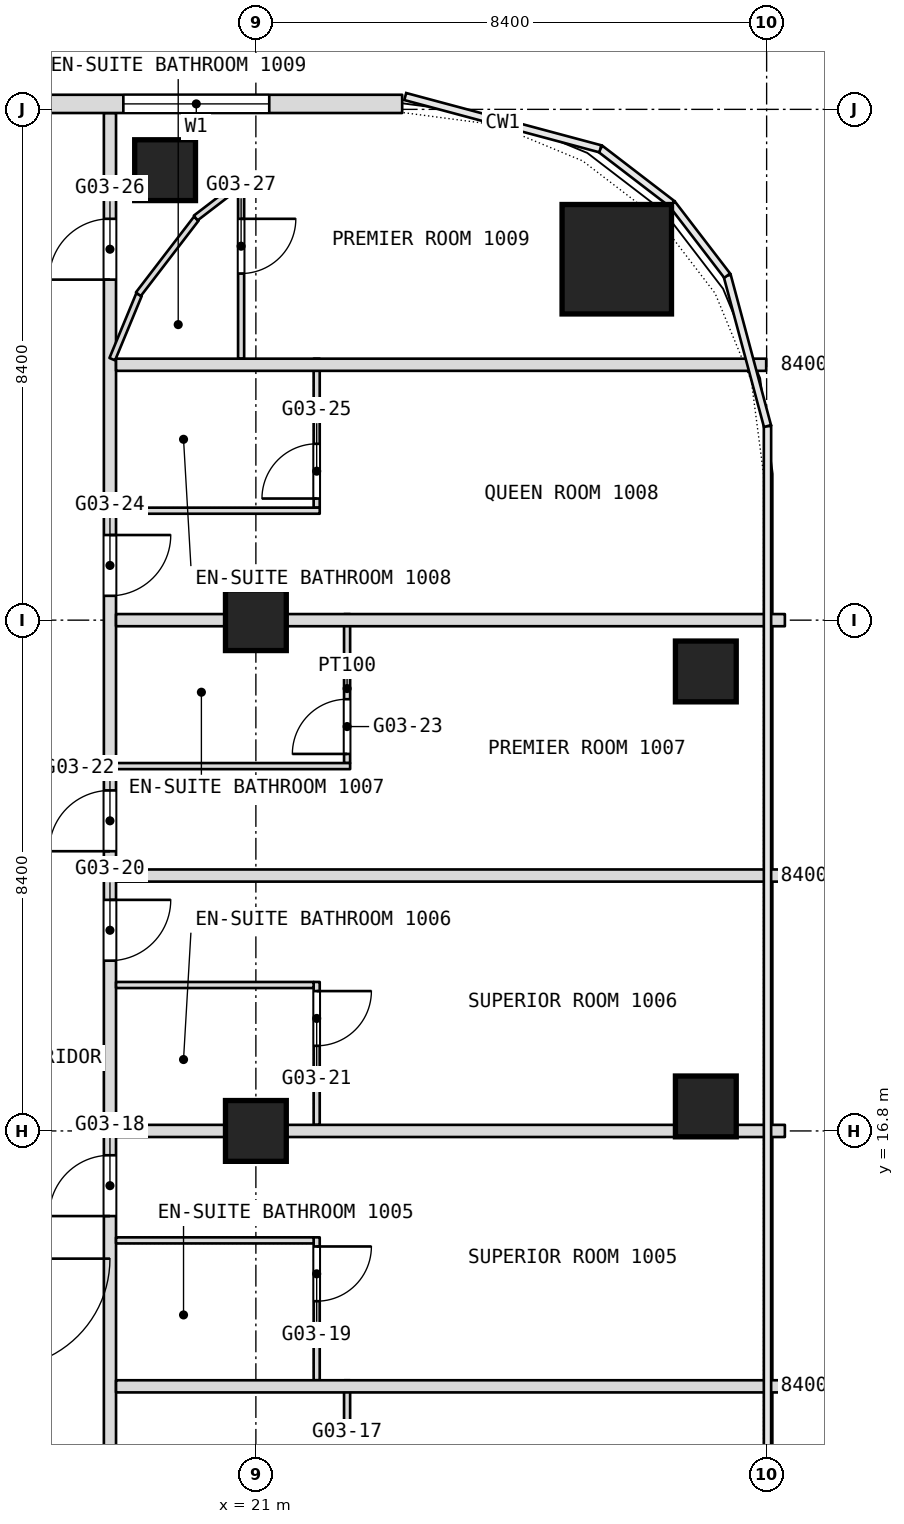
"""IFC4 building model, lengths in metres.
Left out: names, types, materials, properties, quantities, classifications, styles, units other than length and angle.
Written with IfcOpenShell. Run it as: python <this file> out.ifc"""

import sys

from ifc_helpers import new_model, si_unit, direction, frame, frame_2d, origin, origin_2d, place, context, subcontext, project, spatial, rectangle, extrude, element, fill, save


model = new_model("IFC4")
c1 = context("Model", 3, precision=1e-05, world=origin(), true_north=direction((0.0, 1.0)))
c2 = subcontext(c1, "Body", "Model", "MODEL_VIEW")
j1 = project(units=[si_unit("LENGTHUNIT", "METRE"), si_unit("PLANEANGLEUNIT", "RADIAN")], contexts=[c1])
p1 = place(None, origin())
s1 = spatial("IfcSite", under=j1, at=p1, CompositionType="ELEMENT")
p2 = place(p1, origin())
s2 = spatial("IfcBuilding", under=s1, at=p2, CompositionType="ELEMENT")
p3 = place(p2, frame((0.0, 0.0, 50.9)))
s3 = spatial("IfcBuildingStorey", under=s2, at=p3, CompositionType="ELEMENT", Elevation=50.9)
p4 = place(p3, frame((26.936, 31.135, 0.0), z_axis=(0.0, 0.0, 1.0), x_axis=(1.0, 0.0, 0.0)))
e1 = element("IfcColumn", 1, at=p4, inside=s3, PredefinedType="COLUMN", context=c2, shape_type="SweptSolid", body=[
    extrude(rectangle(XDim=1.8, YDim=1.8, at=origin_2d()), origin(), (0.0, 0.0, 1.0), 3.6),
])
for number, where, z_axis, x_axis in (
    (2, (21.0, 16.8, 0.0), (0.0, 0.0, 1.0), (1.0, 0.0, 0.0)),
    (3, (21.0, 25.2, 0.0), (0.0, 0.0, 1.0), (1.0, 0.0, 0.0)),
    (4, (19.507, 32.6, 0.0), (0.0, 0.0, 1.0), (1.0, 0.0, 0.0)),
    (5, (28.4, 24.356, 0.0), (0.0, 0.0, 1.0), (1.0, 0.0, 0.0)),
    (6, (28.4, 17.203, 0.0), (0.0, 0.0, 1.0), (1.0, 0.0, 0.0)),
):
    element("IfcColumn", number, at=place(p3, frame(where, z_axis=z_axis, x_axis=x_axis)), inside=s3, PredefinedType="COLUMN", context=c2, shape_type="SweptSolid", body=[
        extrude(rectangle(XDim=1.0, YDim=1.0, at=origin_2d()), origin(), (0.0, 0.0, 1.0), 3.6),
    ])
p5 = place(p3, frame((22.5, 10.25, 0.0), z_axis=(0.0, 0.0, 1.0), x_axis=(0.0, 1.0, 0.0)))
e7 = element("IfcWall", 7, at=p5, inside=s3, PredefinedType="PARTITIONING", context=c2, shape_type="SweptSolid", body=[
    extrude(rectangle(XDim=2.45, YDim=0.1, at=frame_2d((1.225, 0.0))), origin(), (0.0, 0.0, 1.0), 3.34),
])
p6 = place(p5, frame((0.15, 0.0, 0.0)))
e8 = element("IfcOpeningElement", 8, at=p6, cuts=e7, PredefinedType="OPENING", context=c2, shape_type="SweptSolid", body=[
    extrude(rectangle(XDim=0.9, YDim=2.1, at=frame_2d((0.45, 1.05))), frame((0.0, 0.05, 0.0), z_axis=(0.0, -1.0, 0.0), x_axis=(1.0, 0.0, 0.0)), (0.0, 0.0, 1.0), 0.1),
])
p7 = place(p3, frame((22.5, 22.85, 0.0), z_axis=(0.0, 0.0, 1.0), x_axis=(0.0, 1.0, 0.0)))
e9 = element("IfcWall", 9, at=p7, inside=s3, PredefinedType="PARTITIONING", context=c2, shape_type="SweptSolid", body=[
    extrude(rectangle(XDim=2.45, YDim=0.1, at=frame_2d((1.225, 0.0))), origin(), (0.0, 0.0, 1.0), 3.34),
])
p8 = place(p7, frame((0.15, 0.0, 0.0)))
e10 = element("IfcOpeningElement", 10, at=p8, cuts=e9, PredefinedType="OPENING", context=c2, shape_type="SweptSolid", body=[
    extrude(rectangle(XDim=0.9, YDim=2.1, at=frame_2d((0.45, 1.05))), frame((0.0, 0.05, 0.0), z_axis=(0.0, -1.0, 0.0), x_axis=(1.0, 0.0, 0.0)), (0.0, 0.0, 1.0), 0.1),
])
p9 = place(p3, frame((22.0, 12.7, 0.0), z_axis=(0.0, 0.0, 1.0), x_axis=(0.0, 1.0, 0.0)))
e11 = element("IfcWall", 11, at=p9, inside=s3, PredefinedType="PARTITIONING", context=c2, shape_type="SweptSolid", body=[
    extrude(rectangle(XDim=2.35, YDim=0.1, at=frame_2d((1.175, 0.0))), origin(), (0.0, 0.0, 1.0), 3.34),
])
p10 = place(p9, frame((1.3, 0.0, 0.0)))
e12 = element("IfcOpeningElement", 12, at=p10, cuts=e11, PredefinedType="OPENING", context=c2, shape_type="SweptSolid", body=[
    extrude(rectangle(XDim=0.9, YDim=2.1, at=frame_2d((0.45, 1.05))), frame((0.0, 0.05, 0.0), z_axis=(0.0, -1.0, 0.0), x_axis=(1.0, 0.0, 0.0)), (0.0, 0.0, 1.0), 0.1),
])
p11 = place(p3, frame((22.0, 16.9, 0.0), z_axis=(0.0, 0.0, 1.0), x_axis=(0.0, 1.0, 0.0)))
e13 = element("IfcWall", 13, at=p11, inside=s3, PredefinedType="PARTITIONING", context=c2, shape_type="SweptSolid", body=[
    extrude(rectangle(XDim=2.35, YDim=0.1, at=frame_2d((1.175, 0.0))), origin(), (0.0, 0.0, 1.0), 3.34),
])
p12 = place(p11, frame((1.3, 0.0, 0.0)))
e14 = element("IfcOpeningElement", 14, at=p12, cuts=e13, PredefinedType="OPENING", context=c2, shape_type="SweptSolid", body=[
    extrude(rectangle(XDim=0.9, YDim=2.1, at=frame_2d((0.45, 1.05))), frame((0.0, 0.05, 0.0), z_axis=(0.0, -1.0, 0.0), x_axis=(1.0, 0.0, 0.0)), (0.0, 0.0, 1.0), 0.1),
])
p13 = place(p3, frame((22.0, 27.05, 0.0), z_axis=(0.0, 0.0, 1.0), x_axis=(0.0, 1.0, 0.0)))
e15 = element("IfcWall", 15, at=p13, inside=s3, PredefinedType="PARTITIONING", context=c2, shape_type="SweptSolid", body=[
    extrude(rectangle(XDim=2.45, YDim=0.1, at=frame_2d((1.225, 0.0))), origin(), (0.0, 0.0, 1.0), 3.34),
])
p14 = place(p13, frame((0.15, 0.0, 0.0)))
e16 = element("IfcOpeningElement", 16, at=p14, cuts=e15, PredefinedType="OPENING", context=c2, shape_type="SweptSolid", body=[
    extrude(rectangle(XDim=0.9, YDim=2.1, at=frame_2d((0.45, 1.05))), frame((0.0, 0.05, 0.0), z_axis=(0.0, -1.0, 0.0), x_axis=(1.0, 0.0, 0.0)), (0.0, 0.0, 1.0), 0.1),
])
p15 = place(p3, frame((20.757, 29.5, 0.0), z_axis=(0.0, 0.0, 1.0), x_axis=(0.0, 1.0, 0.0)))
e17 = element("IfcWall", 17, at=p15, inside=s3, PredefinedType="PARTITIONING", context=c2, shape_type="SweptSolid", body=[
    extrude(rectangle(XDim=2.935, YDim=0.1, at=frame_2d((1.468, 0.0))), origin(), (0.0, 0.0, 1.0), 3.34),
])
p16 = place(p15, frame((1.4, 0.0, 0.0)))
e18 = element("IfcOpeningElement", 18, at=p16, cuts=e17, PredefinedType="OPENING", context=c2, shape_type="SweptSolid", body=[
    extrude(rectangle(XDim=0.9, YDim=2.1, at=frame_2d((0.45, 1.05))), frame((0.0, 0.05, 0.0), z_axis=(0.0, -1.0, 0.0), x_axis=(1.0, 0.0, 0.0)), (0.0, 0.0, 1.0), 0.1),
])
p17 = place(p3, frame((18.6, -16.665, 0.0), z_axis=(0.0, 0.0, 1.0), x_axis=(0.0, 1.0, 0.0)))
e19 = element("IfcWall", 19, at=p17, inside=s3, PredefinedType="PARTITIONING", context=c2, shape_type="SweptSolid", body=[
    extrude(rectangle(XDim=50.205, YDim=0.2, at=frame_2d((25.103, 0.0))), origin(), (0.0, 0.0, 1.0), 3.34),
])
p18 = place(p17, frame((5.724, 0.0, 0.0)))
e20 = element("IfcOpeningElement", 20, at=p18, cuts=e19, PredefinedType="OPENING", context=c2, shape_type="SweptSolid", body=[
    extrude(rectangle(XDim=1.1, YDim=2.1, at=frame_2d((0.55, 1.05))), frame((0.0, 0.1, 0.0), z_axis=(0.0, -1.0, 0.0), x_axis=(1.0, 0.0, 0.0)), (0.0, 0.0, 1.0), 0.2),
])
p19 = place(p17, frame((11.865, 0.0, 0.0)))
e21 = element("IfcOpeningElement", 21, at=p19, cuts=e19, PredefinedType="OPENING", context=c2, shape_type="SweptSolid", body=[
    extrude(rectangle(XDim=1.1, YDim=2.1, at=frame_2d((0.55, 1.05))), frame((0.0, 0.1, 0.0), z_axis=(0.0, -1.0, 0.0), x_axis=(1.0, 0.0, 0.0)), (0.0, 0.0, 1.0), 0.2),
])
p20 = place(p17, frame((20.365, 0.0, 0.0)))
e22 = element("IfcOpeningElement", 22, at=p20, cuts=e19, PredefinedType="OPENING", context=c2, shape_type="SweptSolid", body=[
    extrude(rectangle(XDim=1.1, YDim=2.1, at=frame_2d((0.55, 1.05))), frame((0.0, 0.1, 0.0), z_axis=(0.0, -1.0, 0.0), x_axis=(1.0, 0.0, 0.0)), (0.0, 0.0, 1.0), 0.2),
])
p21 = place(p17, frame((25.465, 0.0, 0.0)))
e23 = element("IfcOpeningElement", 23, at=p21, cuts=e19, PredefinedType="OPENING", context=c2, shape_type="SweptSolid", body=[
    extrude(rectangle(XDim=1.0, YDim=2.1, at=frame_2d((0.5, 1.05))), frame((0.0, 0.1, 0.0), z_axis=(0.0, -1.0, 0.0), x_axis=(1.0, 0.0, 0.0)), (0.0, 0.0, 1.0), 0.2),
])
p22 = place(p17, frame((32.065, 0.0, 0.0)))
e24 = element("IfcOpeningElement", 24, at=p22, cuts=e19, PredefinedType="OPENING", context=c2, shape_type="SweptSolid", body=[
    extrude(rectangle(XDim=1.0, YDim=2.1, at=frame_2d((0.5, 1.05))), frame((0.0, 0.1, 0.0), z_axis=(0.0, -1.0, 0.0), x_axis=(1.0, 0.0, 0.0)), (0.0, 0.0, 1.0), 0.2),
])
p23 = place(p17, frame((36.265, 0.0, 0.0)))
e25 = element("IfcOpeningElement", 25, at=p23, cuts=e19, PredefinedType="OPENING", context=c2, shape_type="SweptSolid", body=[
    extrude(rectangle(XDim=1.0, YDim=2.1, at=frame_2d((0.5, 1.05))), frame((0.0, 0.1, 0.0), z_axis=(0.0, -1.0, 0.0), x_axis=(1.0, 0.0, 0.0)), (0.0, 0.0, 1.0), 0.2),
])
p24 = place(p17, frame((38.065, 0.0, 0.0)))
e26 = element("IfcOpeningElement", 26, at=p24, cuts=e19, PredefinedType="OPENING", context=c2, shape_type="SweptSolid", body=[
    extrude(rectangle(XDim=1.0, YDim=2.1, at=frame_2d((0.5, 1.05))), frame((0.0, 0.1, 0.0), z_axis=(0.0, -1.0, 0.0), x_axis=(1.0, 0.0, 0.0)), (0.0, 0.0, 1.0), 0.2),
])
p25 = place(p17, frame((42.265, 0.0, 0.0)))
e27 = element("IfcOpeningElement", 27, at=p25, cuts=e19, PredefinedType="OPENING", context=c2, shape_type="SweptSolid", body=[
    extrude(rectangle(XDim=1.0, YDim=2.1, at=frame_2d((0.5, 1.05))), frame((0.0, 0.1, 0.0), z_axis=(0.0, -1.0, 0.0), x_axis=(1.0, 0.0, 0.0)), (0.0, 0.0, 1.0), 0.2),
])
p26 = place(p17, frame((47.465, 0.0, 0.0)))
e28 = element("IfcOpeningElement", 28, at=p26, cuts=e19, PredefinedType="OPENING", context=c2, shape_type="SweptSolid", body=[
    extrude(rectangle(XDim=1.0, YDim=2.1, at=frame_2d((0.5, 1.05))), frame((0.0, 0.1, 0.0), z_axis=(0.0, -1.0, 0.0), x_axis=(1.0, 0.0, 0.0)), (0.0, 0.0, 1.0), 0.2),
])
p27 = place(p3, frame((18.638, 29.492, 0.0), z_axis=(0.0, 0.0, 1.0), x_axis=(0.382714431757, 0.923866691533, 0.0)))
e29 = element("IfcWall", 29, at=p27, inside=s3, PredefinedType="PARTITIONING", context=c2, shape_type="SweptSolid", body=[
    extrude(rectangle(XDim=1.149, YDim=0.1, at=frame_2d((0.575, 0.0))), origin(), (0.0, 0.0, 1.0), 3.34),
])
p28 = place(p3, frame((19.067, 30.56, 0.0), z_axis=(0.0, 0.0, 1.0), x_axis=(0.608519892166, 0.793538619626, 0.0)))
e30 = element("IfcWall", 30, at=p28, inside=s3, PredefinedType="PARTITIONING", context=c2, shape_type="SweptSolid", body=[
    extrude(rectangle(XDim=1.566, YDim=0.1, at=frame_2d((0.783, 0.0))), origin(), (0.0, 0.0, 1.0), 3.34),
])
p29 = place(p3, frame((18.7, 12.6, 0.0), z_axis=(0.0, 0.0, 1.0), x_axis=(1.0, 0.0, 0.0)))
e31 = element("IfcWall", 31, at=p29, inside=s3, PredefinedType="PARTITIONING", context=c2, shape_type="SweptSolid", body=[
    extrude(rectangle(XDim=11.0, YDim=0.2, at=frame_2d((5.5, 0.0))), origin(), (0.0, 0.0, 1.0), 3.34),
])
p30 = place(p3, frame((20.01, 31.813, 0.0), z_axis=(0.0, 0.0, 1.0), x_axis=(0.793641646693, 0.608385516457, 0.0)))
e32 = element("IfcWall", 32, at=p30, inside=s3, PredefinedType="PARTITIONING", context=c2, shape_type="SweptSolid", body=[
    extrude(rectangle(XDim=0.891, YDim=0.1, at=frame_2d((0.445, 0.0))), origin(), (0.0, 0.0, 1.0), 3.34),
])
p31 = place(p3, frame((18.7, 15.0, 0.0), z_axis=(0.0, 0.0, 1.0), x_axis=(1.0, 0.0, 0.0)))
e33 = element("IfcWall", 33, at=p31, inside=s3, PredefinedType="PARTITIONING", context=c2, shape_type="SweptSolid", body=[
    extrude(rectangle(XDim=3.25, YDim=0.1, at=frame_2d((1.625, 0.0))), origin(), (0.0, 0.0, 1.0), 3.34),
])
p32 = place(p3, frame((18.7, 16.8, 0.0), z_axis=(0.0, 0.0, 1.0), x_axis=(1.0, 0.0, 0.0)))
e34 = element("IfcWall", 34, at=p32, inside=s3, PredefinedType="PARTITIONING", context=c2, shape_type="SweptSolid", body=[
    extrude(rectangle(XDim=11.0, YDim=0.2, at=frame_2d((5.5, 0.0))), origin(), (0.0, 0.0, 1.0), 2.84),
])
p33 = place(p3, frame((18.7, 19.2, 0.0), z_axis=(0.0, 0.0, 1.0), x_axis=(1.0, 0.0, 0.0)))
e35 = element("IfcWall", 35, at=p33, inside=s3, PredefinedType="PARTITIONING", context=c2, shape_type="SweptSolid", body=[
    extrude(rectangle(XDim=3.25, YDim=0.1, at=frame_2d((1.625, 0.0))), origin(), (0.0, 0.0, 1.0), 3.34),
])
p34 = place(p3, frame((18.7, 21.0, 0.0), z_axis=(0.0, 0.0, 1.0), x_axis=(1.0, 0.0, 0.0)))
e36 = element("IfcWall", 36, at=p34, inside=s3, PredefinedType="PARTITIONING", context=c2, shape_type="SweptSolid", body=[
    extrude(rectangle(XDim=11.0, YDim=0.2, at=frame_2d((5.5, 0.0))), origin(), (0.0, 0.0, 1.0), 3.34),
])
p35 = place(p3, frame((18.7, 22.8, 0.0), z_axis=(0.0, 0.0, 1.0), x_axis=(1.0, 0.0, 0.0)))
e37 = element("IfcWall", 37, at=p35, inside=s3, PredefinedType="PARTITIONING", context=c2, shape_type="SweptSolid", body=[
    extrude(rectangle(XDim=3.85, YDim=0.1, at=frame_2d((1.925, 0.0))), origin(), (0.0, 0.0, 1.0), 3.34),
])
p36 = place(p3, frame((18.7, 25.2, 0.0), z_axis=(0.0, 0.0, 1.0), x_axis=(1.0, 0.0, 0.0)))
e38 = element("IfcWall", 38, at=p36, inside=s3, PredefinedType="PARTITIONING", context=c2, shape_type="SweptSolid", body=[
    extrude(rectangle(XDim=11.0, YDim=0.2, at=frame_2d((5.5, 0.0))), origin(), (0.0, 0.0, 1.0), 2.84),
])
p37 = place(p3, frame((18.7, 27.0, 0.0), z_axis=(0.0, 0.0, 1.0), x_axis=(1.0, 0.0, 0.0)))
e39 = element("IfcWall", 39, at=p37, inside=s3, PredefinedType="PARTITIONING", context=c2, shape_type="SweptSolid", body=[
    extrude(rectangle(XDim=3.35, YDim=0.1, at=frame_2d((1.675, 0.0))), origin(), (0.0, 0.0, 1.0), 3.34),
])
p38 = place(p3, frame((18.7, 29.4, 0.0), z_axis=(0.0, 0.0, 1.0), x_axis=(1.0, 0.0, 0.0)))
e40 = element("IfcWall", 40, at=p38, inside=s3, PredefinedType="PARTITIONING", context=c2, shape_type="SweptSolid", body=[
    extrude(rectangle(XDim=10.693, YDim=0.2, at=frame_2d((5.347, 0.0))), origin(), (0.0, 0.0, 1.0), 3.34),
])
p39 = place(p3, frame((23.406, 33.69, 0.0), z_axis=(0.0, 0.0, 1.0), x_axis=(-1.0, 0.0, 0.0)))
e41 = element("IfcWall", 41, at=p39, inside=s3, PredefinedType="NOTDEFINED", context=c2, shape_type="SweptSolid", body=[
    extrude(rectangle(XDim=46.812, YDim=0.3, at=frame_2d((23.406, 0.0))), origin(), (0.0, 0.0, 1.0), 3.6),
])
p40 = place(p39, frame((2.186, 0.0, 0.9)))
e42 = element("IfcOpeningElement", 42, at=p40, cuts=e41, PredefinedType="OPENING", context=c2, shape_type="SweptSolid", body=[
    extrude(rectangle(XDim=2.4, YDim=2.1, at=frame_2d((1.2, 1.05))), frame((0.0, 0.15, 0.0), z_axis=(0.0, -1.0, 0.0), x_axis=(1.0, 0.0, 0.0)), (0.0, 0.0, 1.0), 0.3),
])
p41 = place(p39, frame((7.506, 0.0, 0.9)))
e43 = element("IfcOpeningElement", 43, at=p41, cuts=e41, PredefinedType="OPENING", context=c2, shape_type="SweptSolid", body=[
    extrude(rectangle(XDim=2.4, YDim=2.1, at=frame_2d((1.2, 1.05))), frame((0.0, 0.15, 0.0), z_axis=(0.0, -1.0, 0.0), x_axis=(1.0, 0.0, 0.0)), (0.0, 0.0, 1.0), 0.3),
])
p42 = place(p39, frame((11.706, 0.0, 0.9)))
e44 = element("IfcOpeningElement", 44, at=p42, cuts=e41, PredefinedType="OPENING", context=c2, shape_type="SweptSolid", body=[
    extrude(rectangle(XDim=2.4, YDim=2.1, at=frame_2d((1.2, 1.05))), frame((0.0, 0.15, 0.0), z_axis=(0.0, -1.0, 0.0), x_axis=(1.0, 0.0, 0.0)), (0.0, 0.0, 1.0), 0.3),
])
p43 = place(p39, frame((15.906, 0.0, 0.9)))
e45 = element("IfcOpeningElement", 45, at=p43, cuts=e41, PredefinedType="OPENING", context=c2, shape_type="SweptSolid", body=[
    extrude(rectangle(XDim=2.4, YDim=2.1, at=frame_2d((1.2, 1.05))), frame((0.0, 0.15, 0.0), z_axis=(0.0, -1.0, 0.0), x_axis=(1.0, 0.0, 0.0)), (0.0, 0.0, 1.0), 0.3),
])
p44 = place(p39, frame((20.106, 0.0, 0.9)))
e46 = element("IfcOpeningElement", 46, at=p44, cuts=e41, PredefinedType="OPENING", context=c2, shape_type="SweptSolid", body=[
    extrude(rectangle(XDim=2.4, YDim=2.1, at=frame_2d((1.2, 1.05))), frame((0.0, 0.15, 0.0), z_axis=(0.0, -1.0, 0.0), x_axis=(1.0, 0.0, 0.0)), (0.0, 0.0, 1.0), 0.3),
])
p45 = place(p39, frame((24.306, 0.0, 0.9)))
e47 = element("IfcOpeningElement", 47, at=p45, cuts=e41, PredefinedType="OPENING", context=c2, shape_type="SweptSolid", body=[
    extrude(rectangle(XDim=2.4, YDim=2.1, at=frame_2d((1.2, 1.05))), frame((0.0, 0.15, 0.0), z_axis=(0.0, -1.0, 0.0), x_axis=(1.0, 0.0, 0.0)), (0.0, 0.0, 1.0), 0.3),
])
p46 = place(p39, frame((28.506, 0.0, 0.9)))
e48 = element("IfcOpeningElement", 48, at=p46, cuts=e41, PredefinedType="OPENING", context=c2, shape_type="SweptSolid", body=[
    extrude(rectangle(XDim=2.4, YDim=2.1, at=frame_2d((1.2, 1.05))), frame((0.0, 0.15, 0.0), z_axis=(0.0, -1.0, 0.0), x_axis=(1.0, 0.0, 0.0)), (0.0, 0.0, 1.0), 0.3),
])
p47 = place(p39, frame((32.706, 0.0, 0.9)))
e49 = element("IfcOpeningElement", 49, at=p47, cuts=e41, PredefinedType="OPENING", context=c2, shape_type="SweptSolid", body=[
    extrude(rectangle(XDim=2.4, YDim=2.1, at=frame_2d((1.2, 1.05))), frame((0.0, 0.15, 0.0), z_axis=(0.0, -1.0, 0.0), x_axis=(1.0, 0.0, 0.0)), (0.0, 0.0, 1.0), 0.3),
])
p48 = place(p39, frame((36.906, 0.0, 0.9)))
e50 = element("IfcOpeningElement", 50, at=p48, cuts=e41, PredefinedType="OPENING", context=c2, shape_type="SweptSolid", body=[
    extrude(rectangle(XDim=2.4, YDim=2.1, at=frame_2d((1.2, 1.05))), frame((0.0, 0.15, 0.0), z_axis=(0.0, -1.0, 0.0), x_axis=(1.0, 0.0, 0.0)), (0.0, 0.0, 1.0), 0.3),
])
p49 = place(p39, frame((42.226, 0.0, 0.9)))
e51 = element("IfcOpeningElement", 51, at=p49, cuts=e41, PredefinedType="OPENING", context=c2, shape_type="SweptSolid", body=[
    extrude(rectangle(XDim=2.4, YDim=2.1, at=frame_2d((1.2, 1.05))), frame((0.0, 0.15, 0.0), z_axis=(0.0, -1.0, 0.0), x_axis=(1.0, 0.0, 0.0)), (0.0, 0.0, 1.0), 0.3),
])
p50 = place(p8, origin())
e52 = element("IfcDoor", 52, at=p50, inside=s3, OperationType="SINGLE_SWING_LEFT", PredefinedType="DOOR", context=c2, shape_type="SweptSolid", body=[
    extrude(rectangle(XDim=0.9, YDim=2.1, at=frame_2d((0.45, 1.05))), frame((0.0, 0.025, 0.0), z_axis=(0.0, -1.0, 0.0), x_axis=(1.0, 0.0, 0.0)), (0.0, 0.0, 1.0), 0.05),
])
fill(e10, e52)
p51 = place(p10, origin())
e53 = element("IfcDoor", 53, at=p51, inside=s3, OperationType="SINGLE_SWING_RIGHT", PredefinedType="DOOR", context=c2, shape_type="SweptSolid", body=[
    extrude(rectangle(XDim=0.9, YDim=2.1, at=frame_2d((0.45, 1.05))), frame((0.0, 0.025, 0.0), z_axis=(0.0, -1.0, 0.0), x_axis=(1.0, 0.0, 0.0)), (0.0, 0.0, 1.0), 0.05),
])
fill(e12, e53)
p52 = place(p12, origin())
e54 = element("IfcDoor", 54, at=p52, inside=s3, OperationType="SINGLE_SWING_RIGHT", PredefinedType="DOOR", context=c2, shape_type="SweptSolid", body=[
    extrude(rectangle(XDim=0.9, YDim=2.1, at=frame_2d((0.45, 1.05))), frame((0.0, 0.025, 0.0), z_axis=(0.0, -1.0, 0.0), x_axis=(1.0, 0.0, 0.0)), (0.0, 0.0, 1.0), 0.05),
])
fill(e14, e54)
p53 = place(p14, origin())
e55 = element("IfcDoor", 55, at=p53, inside=s3, OperationType="SINGLE_SWING_LEFT", PredefinedType="DOOR", context=c2, shape_type="SweptSolid", body=[
    extrude(rectangle(XDim=0.9, YDim=2.1, at=frame_2d((0.45, 1.05))), frame((0.0, 0.025, 0.0), z_axis=(0.0, -1.0, 0.0), x_axis=(1.0, 0.0, 0.0)), (0.0, 0.0, 1.0), 0.05),
])
fill(e16, e55)
p54 = place(p16, origin())
e56 = element("IfcDoor", 56, at=p54, inside=s3, OperationType="SINGLE_SWING_RIGHT", PredefinedType="DOOR", context=c2, shape_type="SweptSolid", body=[
    extrude(rectangle(XDim=0.9, YDim=2.1, at=frame_2d((0.45, 1.05))), frame((0.0, 0.025, 0.0), z_axis=(0.0, -1.0, 0.0), x_axis=(1.0, 0.0, 0.0)), (0.0, 0.0, 1.0), 0.05),
])
fill(e18, e56)
p55 = place(p22, origin())
e57 = element("IfcDoor", 57, at=p55, inside=s3, OperationType="SINGLE_SWING_RIGHT", PredefinedType="DOOR", context=c2, shape_type="SweptSolid", body=[
    extrude(rectangle(XDim=1.0, YDim=2.1, at=frame_2d((0.5, 1.05))), frame((0.0, 0.025, 0.0), z_axis=(0.0, -1.0, 0.0), x_axis=(1.0, 0.0, 0.0)), (0.0, 0.0, 1.0), 0.05),
])
fill(e24, e57)
p56 = place(p23, origin())
e58 = element("IfcDoor", 58, at=p56, inside=s3, OperationType="SINGLE_SWING_RIGHT", PredefinedType="DOOR", context=c2, shape_type="SweptSolid", body=[
    extrude(rectangle(XDim=1.0, YDim=2.1, at=frame_2d((0.5, 1.05))), frame((0.0, 0.025, 0.0), z_axis=(0.0, -1.0, 0.0), x_axis=(1.0, 0.0, 0.0)), (0.0, 0.0, 1.0), 0.05),
])
fill(e25, e58)
p57 = place(p24, origin())
e59 = element("IfcDoor", 59, at=p57, inside=s3, OperationType="SINGLE_SWING_RIGHT", PredefinedType="DOOR", context=c2, shape_type="SweptSolid", body=[
    extrude(rectangle(XDim=1.0, YDim=2.1, at=frame_2d((0.5, 1.05))), frame((0.0, 0.025, 0.0), z_axis=(0.0, -1.0, 0.0), x_axis=(1.0, 0.0, 0.0)), (0.0, 0.0, 1.0), 0.05),
])
fill(e26, e59)
p58 = place(p25, origin())
e60 = element("IfcDoor", 60, at=p58, inside=s3, OperationType="SINGLE_SWING_RIGHT", PredefinedType="DOOR", context=c2, shape_type="SweptSolid", body=[
    extrude(rectangle(XDim=1.0, YDim=2.1, at=frame_2d((0.5, 1.05))), frame((0.0, 0.025, 0.0), z_axis=(0.0, -1.0, 0.0), x_axis=(1.0, 0.0, 0.0)), (0.0, 0.0, 1.0), 0.05),
])
fill(e27, e60)
p59 = place(p26, origin())
e61 = element("IfcDoor", 61, at=p59, inside=s3, OperationType="SINGLE_SWING_RIGHT", PredefinedType="DOOR", context=c2, shape_type="SweptSolid", body=[
    extrude(rectangle(XDim=1.0, YDim=2.1, at=frame_2d((0.5, 1.05))), frame((0.0, 0.025, 0.0), z_axis=(0.0, -1.0, 0.0), x_axis=(1.0, 0.0, 0.0)), (0.0, 0.0, 1.0), 0.05),
])
fill(e28, e61)
p60 = place(p40, origin())
e62 = element("IfcWindow", 62, at=p60, inside=s3, PartitioningType="SINGLE_PANEL", PredefinedType="WINDOW", context=c2, shape_type="SweptSolid", body=[
    extrude(rectangle(XDim=2.4, YDim=2.1, at=frame_2d((1.2, 1.05))), frame((0.0, 0.03, 0.0), z_axis=(0.0, -1.0, 0.0), x_axis=(1.0, 0.0, 0.0)), (0.0, 0.0, 1.0), 0.06),
])
fill(e42, e62)
save(model, sys.argv[1])
